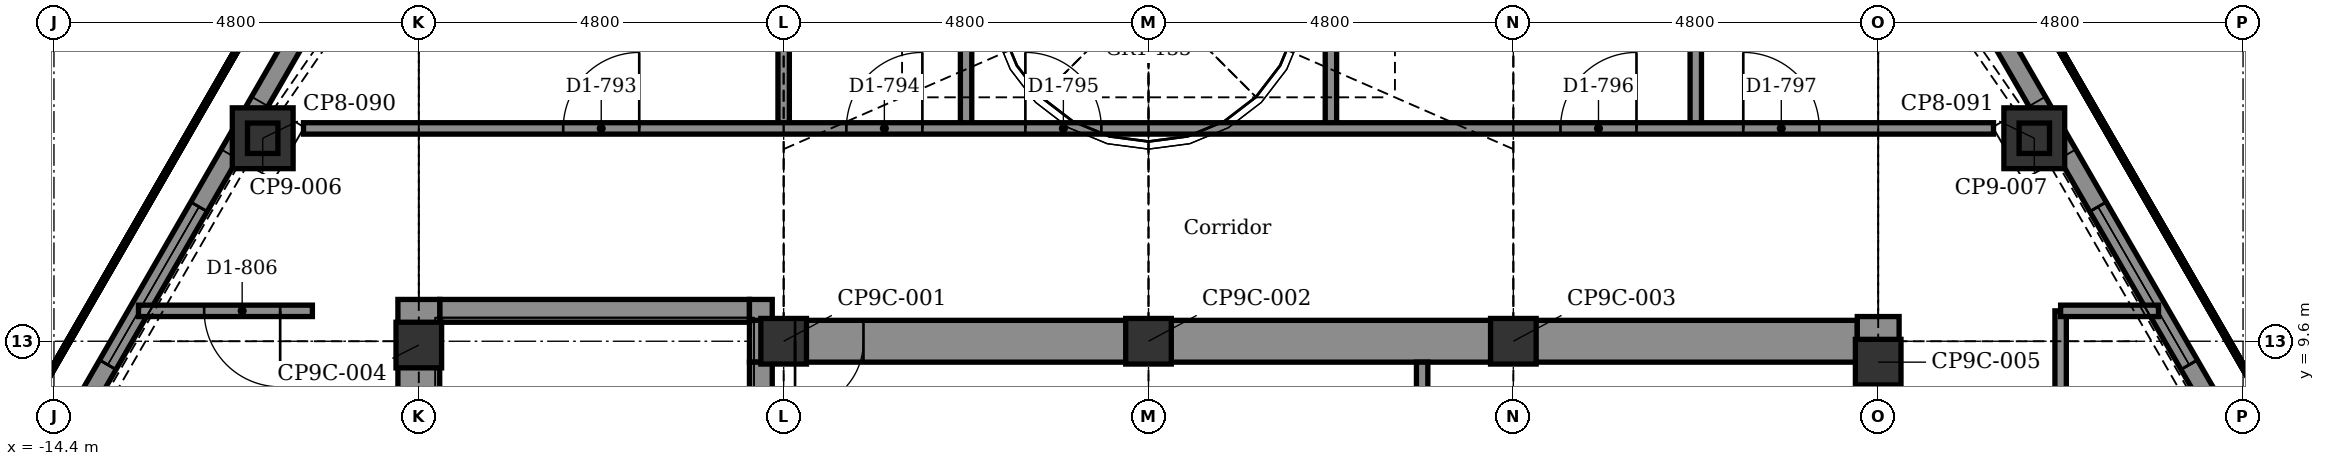
"""IFC4 building model, lengths in metres.
Left out: names, types, materials, properties, quantities, classifications, styles, units other than length and angle.
Written with IfcOpenShell. Run it as: python <this file> out.ifc"""

import sys

from ifc_helpers import new_model, si_unit, direction, frame, frame_2d, origin, origin_2d, place, context, subcontext, project, spatial, polyline, rectangle, hollow_rectangle, outline, extrude, element, fill, save


model = new_model("IFC4")
c1 = context("Model", 3, precision=1e-05, world=origin(), true_north=direction((0.0, 1.0)))
c2 = subcontext(c1, "Body", "Model", "MODEL_VIEW")
j1 = project(units=[si_unit("LENGTHUNIT", "METRE"), si_unit("PLANEANGLEUNIT", "RADIAN")], contexts=[c1])
p1 = place(None, origin())
s1 = spatial("IfcSite", under=j1, at=p1, CompositionType="ELEMENT")
p2 = place(p1, origin())
s2 = spatial("IfcBuilding", under=s1, at=p2, CompositionType="ELEMENT")
p3 = place(p2, frame((0.0, 0.0, 301.9)))
s3 = spatial("IfcBuildingStorey", under=s2, at=p3, CompositionType="ELEMENT", Elevation=301.9)
for number, where, z_axis, x_axis in (
    (1, (11.654, 12.271, -0.3), (0.0, 0.0, 1.0), (0.866, 0.5, 0.0)),
    (2, (-11.654, 12.271, -0.3), (0.0, 0.0, 1.0), (0.5, 0.866, 0.0)),
):
    element("IfcColumn", number, at=place(p3, frame(where, z_axis=z_axis, x_axis=x_axis)), inside=s3, PredefinedType="COLUMN", context=c2, shape_type="SweptSolid", body=[
        extrude(rectangle(XDim=0.8, YDim=0.8, at=origin_2d()), origin(), (0.0, 0.0, 1.0), 5.3),
    ])
p4 = place(p3, frame((-5.25, 9.6, -0.3), z_axis=(0.0, 0.0, 1.0), x_axis=(1.0, 0.0, 0.0)))
e3 = element("IfcWall", 3, at=p4, inside=s3, PredefinedType="SHEAR", context=c2, shape_type="SweptSolid", body=[
    extrude(rectangle(XDim=14.575, YDim=0.55, at=frame_2d((7.288, 0.0))), origin(), (0.0, 0.0, 1.0), 5.3),
])
p5 = place(p4, frame((0.6, 0.0, 0.3)))
e4 = element("IfcOpeningElement", 4, at=p5, cuts=e3, PredefinedType="OPENING", context=c2, shape_type="SweptSolid", body=[
    extrude(rectangle(XDim=0.9, YDim=2.1, at=frame_2d((0.45, 1.05))), frame((0.0, 0.285, 0.0), z_axis=(0.0, -1.0, 0.0), x_axis=(1.0, 0.0, 0.0)), (0.0, 0.0, 1.0), 0.57),
])
p6 = place(p3, frame((-9.325, 10.0, -0.3), z_axis=(0.0, 0.0, 1.0), x_axis=(1.0, 0.0, 0.0)))
e5 = element("IfcWall", 5, at=p6, inside=s3, PredefinedType="STANDARD", context=c2, shape_type="SweptSolid", body=[
    extrude(rectangle(XDim=4.075, YDim=0.3, at=frame_2d((2.038, 0.0))), origin(), (0.0, 0.0, 1.0), 5.3),
])
p7 = place(p3, frame((-9.6, 2.55, -0.3), z_axis=(0.0, 0.0, 1.0), x_axis=(0.0, 1.0, 0.0)))
e6 = element("IfcWall", 6, at=p7, inside=s3, PredefinedType="SHEAR", context=c2, shape_type="SweptSolid", body=[
    extrude(rectangle(XDim=7.6, YDim=0.55, at=frame_2d((3.8, 0.0))), origin(), (0.0, 0.0, 1.0), 5.3),
])
p8 = place(p3, frame((-5.1, 2.25, -0.3), z_axis=(0.0, 0.0, 1.0), x_axis=(0.0, 1.0, 0.0)))
e7 = element("IfcWall", 7, at=p8, inside=s3, PredefinedType="STANDARD", context=c2, shape_type="SweptSolid", body=[
    extrude(rectangle(XDim=7.075, YDim=0.3, at=frame_2d((3.538, 0.0))), origin(), (0.0, 0.0, 1.0), 5.3),
])
p9 = place(p8, frame((2.0, 0.0, 0.3)))
e8 = element("IfcOpeningElement", 8, at=p9, cuts=e7, PredefinedType="OPENING", context=c2, shape_type="SweptSolid", body=[
    extrude(rectangle(XDim=1.2, YDim=2.1, at=frame_2d((0.6, 1.05))), frame((0.0, 0.16, 0.0), z_axis=(0.0, -1.0, 0.0), x_axis=(1.0, 0.0, 0.0)), (0.0, 0.0, 1.0), 0.32),
])
p10 = place(p3, frame((-5.1, 9.875, -0.3), z_axis=(0.0, 0.0, 1.0), x_axis=(0.0, 1.0, 0.0)))
e9 = element("IfcWall", 9, at=p10, inside=s3, PredefinedType="STANDARD", context=c2, shape_type="SweptSolid", body=[
    extrude(rectangle(XDim=0.275, YDim=0.3, at=frame_2d((0.137, 0.0))), origin(), (0.0, 0.0, 1.0), 5.3),
])
p11 = place(p3, frame((9.6, -10.15, -0.3), z_axis=(0.0, 0.0, 1.0), x_axis=(0.0, 1.0, 0.0)))
e10 = element("IfcWall", 10, at=p11, inside=s3, PredefinedType="SHEAR", context=c2, shape_type="SweptSolid", body=[
    extrude(rectangle(XDim=20.075, YDim=0.55, at=frame_2d((10.038, 0.0))), origin(), (0.0, 0.0, 1.0), 5.3),
])
for number, where, z_axis, x_axis in (
    (11, (11.654, 12.271, 5.0), (0.0, 0.0, 1.0), (1.0, 0.0, 0.0)),
    (12, (-11.654, 12.271, 5.0), (0.0, 0.0, 1.0), (1.0, 0.0, 0.0)),
):
    element("IfcColumn", number, at=place(p3, frame(where, z_axis=z_axis, x_axis=x_axis)), inside=s3, PredefinedType="COLUMN", context=c2, shape_type="SweptSolid", body=[
        extrude(hollow_rectangle(XDim=0.4, YDim=0.4, WallThickness=0.02, at=origin_2d()), origin(), (0.0, 0.0, 1.0), 17.513),
    ])
p12 = place(p3, frame((-9.6, 9.55, 5.0), z_axis=(0.0, 0.0, 1.0), x_axis=(1.0, 0.0, 0.0)))
e13 = element("IfcColumn", 13, at=p12, inside=s3, PredefinedType="COLUMN", context=c2, shape_type="SweptSolid", body=[
    extrude(hollow_rectangle(XDim=0.6, YDim=0.6, WallThickness=0.032, at=origin_2d()), origin(), (0.0, 0.0, 1.0), 15.709),
])
for number, where, z_axis, x_axis in (
    (14, (-4.8, 9.6, 5.0), (0.0, 0.0, 1.0), (1.0, 0.0, 0.0)),
    (15, (0.0, 9.6, 5.0), (0.0, 0.0, 1.0), (1.0, 0.0, 0.0)),
    (16, (4.8, 9.6, 5.0), (0.0, 0.0, 1.0), (1.0, 0.0, 0.0)),
):
    element("IfcColumn", number, at=place(p3, frame(where, z_axis=z_axis, x_axis=x_axis)), inside=s3, PredefinedType="COLUMN", context=c2, shape_type="SweptSolid", body=[
        extrude(hollow_rectangle(XDim=0.6, YDim=0.6, WallThickness=0.032, at=origin_2d()), origin(), (0.0, 0.0, 1.0), 14.915),
    ])
p13 = place(p3, frame((9.6, 9.325, 5.0), z_axis=(0.0, 0.0, 1.0), x_axis=(1.0, 0.0, 0.0)))
e17 = element("IfcColumn", 17, at=p13, inside=s3, PredefinedType="COLUMN", context=c2, shape_type="SweptSolid", body=[
    extrude(hollow_rectangle(XDim=0.6, YDim=0.6, WallThickness=0.032, at=origin_2d()), origin(), (0.0, 0.0, 1.0), 15.569),
])
p14 = place(p3, frame((10.358, 15.065, 0.0), z_axis=(0.0, 0.0, 1.0), x_axis=(0.500010301671, -0.86601945603, 0.0)))
e18 = element("IfcWall", 18, at=p14, inside=s3, PredefinedType="SOLIDWALL", context=c2, shape_type="SweptSolid", body=[
    extrude(outline(polyline([(0.0, 0.0), (15.736, 0.0), (15.736, 15.994), (0.0, 24.509), (0.0, 0.0)])), frame((0.0, 0.125, 0.0), z_axis=(0.0, -1.0, 0.0), x_axis=(1.0, 0.0, 0.0)), (0.0, 0.0, 1.0), 0.25),
])
p15 = place(p14, frame((4.268, 0.0, 5.8)))
e19 = element("IfcOpeningElement", 19, at=p15, cuts=e18, PredefinedType="OPENING", context=c2, shape_type="SweptSolid", body=[
    extrude(rectangle(XDim=2.4, YDim=3.6, at=frame_2d((1.2, 1.8))), frame((0.0, 0.135, 0.0), z_axis=(0.0, -1.0, 0.0), x_axis=(1.0, 0.0, 0.0)), (0.0, 0.0, 1.0), 0.27),
])
p16 = place(p14, frame((4.268, 0.0, 10.0)))
e20 = element("IfcOpeningElement", 20, at=p16, cuts=e18, PredefinedType="OPENING", context=c2, shape_type="SweptSolid", body=[
    extrude(rectangle(XDim=2.4, YDim=3.6, at=frame_2d((1.2, 1.8))), frame((0.0, 0.135, 0.0), z_axis=(0.0, -1.0, 0.0), x_axis=(1.0, 0.0, 0.0)), (0.0, 0.0, 1.0), 0.27),
])
p17 = place(p14, frame((4.268, 0.0, 14.2)))
e21 = element("IfcOpeningElement", 21, at=p17, cuts=e18, PredefinedType="OPENING", context=c2, shape_type="SweptSolid", body=[
    extrude(rectangle(XDim=2.4, YDim=3.6, at=frame_2d((1.2, 1.8))), frame((0.0, 0.135, 0.0), z_axis=(0.0, -1.0, 0.0), x_axis=(1.0, 0.0, 0.0)), (0.0, 0.0, 1.0), 0.27),
])
p18 = place(p14, frame((9.068, 0.0, 5.8)))
e22 = element("IfcOpeningElement", 22, at=p18, cuts=e18, PredefinedType="OPENING", context=c2, shape_type="SweptSolid", body=[
    extrude(rectangle(XDim=2.4, YDim=3.6, at=frame_2d((1.2, 1.8))), frame((0.0, 0.135, 0.0), z_axis=(0.0, -1.0, 0.0), x_axis=(1.0, 0.0, 0.0)), (0.0, 0.0, 1.0), 0.27),
])
p19 = place(p14, frame((9.068, 0.0, 10.0)))
e23 = element("IfcOpeningElement", 23, at=p19, cuts=e18, PredefinedType="OPENING", context=c2, shape_type="SweptSolid", body=[
    extrude(rectangle(XDim=2.4, YDim=3.6, at=frame_2d((1.2, 1.8))), frame((0.0, 0.135, 0.0), z_axis=(0.0, -1.0, 0.0), x_axis=(1.0, 0.0, 0.0)), (0.0, 0.0, 1.0), 0.27),
])
p20 = place(p14, frame((9.068, 0.0, 1.0)))
e24 = element("IfcOpeningElement", 24, at=p20, cuts=e18, PredefinedType="OPENING", context=c2, shape_type="SweptSolid", body=[
    extrude(rectangle(XDim=2.4, YDim=3.0, at=frame_2d((1.2, 1.5))), frame((0.0, 0.135, 0.0), z_axis=(0.0, -1.0, 0.0), x_axis=(1.0, 0.0, 0.0)), (0.0, 0.0, 1.0), 0.27),
])
p21 = place(p3, frame((-18.226, 1.438, 0.0), z_axis=(0.0, 0.0, 1.0), x_axis=(0.500010301671, 0.86601945603, 0.0)))
e25 = element("IfcWall", 25, at=p21, inside=s3, PredefinedType="SOLIDWALL", context=c2, shape_type="SweptSolid", body=[
    extrude(outline(polyline([(0.0, 0.0), (15.736, 0.0), (15.736, 24.509), (0.0, 15.994), (0.0, 0.0)])), frame((0.0, 0.125, 0.0), z_axis=(0.0, -1.0, 0.0), x_axis=(1.0, 0.0, 0.0)), (0.0, 0.0, 1.0), 0.25),
])
p22 = place(p21, frame((4.268, 0.0, 5.8)))
e26 = element("IfcOpeningElement", 26, at=p22, cuts=e25, PredefinedType="OPENING", context=c2, shape_type="SweptSolid", body=[
    extrude(rectangle(XDim=2.4, YDim=3.6, at=frame_2d((1.2, 1.8))), frame((0.0, 0.135, 0.0), z_axis=(0.0, -1.0, 0.0), x_axis=(1.0, 0.0, 0.0)), (0.0, 0.0, 1.0), 0.27),
])
p23 = place(p21, frame((4.268, 0.0, 10.0)))
e27 = element("IfcOpeningElement", 27, at=p23, cuts=e25, PredefinedType="OPENING", context=c2, shape_type="SweptSolid", body=[
    extrude(rectangle(XDim=2.4, YDim=3.6, at=frame_2d((1.2, 1.8))), frame((0.0, 0.135, 0.0), z_axis=(0.0, -1.0, 0.0), x_axis=(1.0, 0.0, 0.0)), (0.0, 0.0, 1.0), 0.27),
])
p24 = place(p21, frame((9.068, 0.0, 5.8)))
e28 = element("IfcOpeningElement", 28, at=p24, cuts=e25, PredefinedType="OPENING", context=c2, shape_type="SweptSolid", body=[
    extrude(rectangle(XDim=2.4, YDim=3.6, at=frame_2d((1.2, 1.8))), frame((0.0, 0.135, 0.0), z_axis=(0.0, -1.0, 0.0), x_axis=(1.0, 0.0, 0.0)), (0.0, 0.0, 1.0), 0.27),
])
p25 = place(p21, frame((9.068, 0.0, 10.0)))
e29 = element("IfcOpeningElement", 29, at=p25, cuts=e25, PredefinedType="OPENING", context=c2, shape_type="SweptSolid", body=[
    extrude(rectangle(XDim=2.4, YDim=3.6, at=frame_2d((1.2, 1.8))), frame((0.0, 0.135, 0.0), z_axis=(0.0, -1.0, 0.0), x_axis=(1.0, 0.0, 0.0)), (0.0, 0.0, 1.0), 0.27),
])
p26 = place(p21, frame((9.068, 0.0, 14.2)))
e30 = element("IfcOpeningElement", 30, at=p26, cuts=e25, PredefinedType="OPENING", context=c2, shape_type="SweptSolid", body=[
    extrude(rectangle(XDim=2.4, YDim=3.6, at=frame_2d((1.2, 1.8))), frame((0.0, 0.135, 0.0), z_axis=(0.0, -1.0, 0.0), x_axis=(1.0, 0.0, 0.0)), (0.0, 0.0, 1.0), 0.27),
])
p27 = place(p21, frame((4.268, 0.0, 1.0)))
e31 = element("IfcOpeningElement", 31, at=p27, cuts=e25, PredefinedType="OPENING", context=c2, shape_type="SweptSolid", body=[
    extrude(rectangle(XDim=2.4, YDim=3.0, at=frame_2d((1.2, 1.5))), frame((0.0, 0.135, 0.0), z_axis=(0.0, -1.0, 0.0), x_axis=(1.0, 0.0, 0.0)), (0.0, 0.0, 1.0), 0.27),
])
p28 = place(p3, frame((12.0, -10.0, 0.0), z_axis=(0.0, 0.0, 1.0), x_axis=(0.0, 1.0, 0.0)))
e32 = element("IfcWall", 32, at=p28, inside=s3, PredefinedType="PARTITIONING", context=c2, shape_type="SweptSolid", body=[
    extrude(rectangle(XDim=20.0, YDim=0.15, at=frame_2d((10.0, 0.0))), origin(), (0.0, 0.0, 1.0), 5.0),
])
p29 = place(p28, frame((9.5, 0.0, 0.0)))
e33 = element("IfcOpeningElement", 33, at=p29, cuts=e32, PredefinedType="OPENING", context=c2, shape_type="SweptSolid", body=[
    extrude(rectangle(XDim=1.0, YDim=2.1, at=frame_2d((0.5, 1.05))), frame((0.0, 0.085, 0.0), z_axis=(0.0, -1.0, 0.0), x_axis=(1.0, 0.0, 0.0)), (0.0, 0.0, 1.0), 0.17),
])
p30 = place(p3, frame((7.2, 12.4, 0.0), z_axis=(0.0, 0.0, 1.0), x_axis=(0.0, 1.0, 0.0)))
e34 = element("IfcWall", 34, at=p30, inside=s3, PredefinedType="PARTITIONING", context=c2, shape_type="SweptSolid", body=[
    extrude(rectangle(XDim=4.058, YDim=0.15, at=frame_2d((2.029, 0.0))), origin(), (0.0, 0.0, 1.0), 5.0),
])
p31 = place(p3, frame((3.6, 6.0, 0.0), z_axis=(0.0, 0.0, 1.0), x_axis=(0.0, 1.0, 0.0)))
e35 = element("IfcWall", 35, at=p31, inside=s3, PredefinedType="PARTITIONING", context=c2, shape_type="SweptSolid", body=[
    extrude(rectangle(XDim=3.325, YDim=0.15, at=frame_2d((1.663, 0.0))), origin(), (0.0, 0.0, 1.0), 5.0),
])
p32 = place(p31, frame((1.4, 0.0, 0.0)))
e36 = element("IfcOpeningElement", 36, at=p32, cuts=e35, PredefinedType="OPENING", context=c2, shape_type="SweptSolid", body=[
    extrude(rectangle(XDim=0.8, YDim=2.1, at=frame_2d((0.4, 1.05))), frame((0.0, 0.085, 0.0), z_axis=(0.0, -1.0, 0.0), x_axis=(1.0, 0.0, 0.0)), (0.0, 0.0, 1.0), 0.17),
])
for number, where, z_axis, x_axis in (
    (37, (2.4, 12.4, 0.0), (0.0, 0.0, 1.0), (0.0, 1.0, 0.0)),
    (38, (-2.4, 12.4, 0.0), (0.0, 0.0, 1.0), (0.0, 1.0, 0.0)),
):
    element("IfcWall", number, at=place(p3, frame(where, z_axis=z_axis, x_axis=x_axis)), inside=s3, PredefinedType="PARTITIONING", context=c2, shape_type="SweptSolid", body=[
        extrude(rectangle(XDim=4.058, YDim=0.15, at=frame_2d((2.029, 0.0))), origin(), (0.0, 0.0, 1.0), 5.0),
    ])
p33 = place(p3, frame((-4.8, 12.4, 0.0), z_axis=(0.0, 0.0, 1.0), x_axis=(0.0, 1.0, 0.0)))
e39 = element("IfcWall", 39, at=p33, inside=s3, PredefinedType="PARTITIONING", context=c2, shape_type="SweptSolid", body=[
    extrude(rectangle(XDim=3.428, YDim=0.15, at=frame_2d((1.714, 0.0))), origin(), (0.0, 0.0, 1.0), 5.0),
])
p34 = place(p3, frame((-13.288, 10.0, 0.0), z_axis=(0.0, 0.0, 1.0), x_axis=(1.0, 0.0, 0.0)))
e40 = element("IfcWall", 40, at=p34, inside=s3, PredefinedType="PARTITIONING", context=c2, shape_type="SweptSolid", body=[
    extrude(rectangle(XDim=2.288, YDim=0.15, at=frame_2d((1.144, 0.0))), origin(), (0.0, 0.0, 1.0), 5.0),
])
p35 = place(p34, frame((0.864, 0.0, 0.0)))
e41 = element("IfcOpeningElement", 41, at=p35, cuts=e40, PredefinedType="OPENING", context=c2, shape_type="SweptSolid", body=[
    extrude(rectangle(XDim=1.0, YDim=2.1, at=frame_2d((0.5, 1.05))), frame((0.0, 0.085, 0.0), z_axis=(0.0, -1.0, 0.0), x_axis=(1.0, 0.0, 0.0)), (0.0, 0.0, 1.0), 0.17),
])
p36 = place(p3, frame((12.0, 10.0, 0.0), z_axis=(0.0, 0.0, 1.0), x_axis=(1.0, 0.0, 0.0)))
e42 = element("IfcWall", 42, at=p36, inside=s3, PredefinedType="PARTITIONING", context=c2, shape_type="SweptSolid", body=[
    extrude(rectangle(XDim=1.288, YDim=0.15, at=frame_2d((0.644, 0.0))), origin(), (0.0, 0.0, 1.0), 5.0),
])
p37 = place(p3, frame((-11.117, 12.4, 0.0), z_axis=(0.0, 0.0, 1.0), x_axis=(1.0, 0.0, 0.0)))
e43 = element("IfcWall", 43, at=p37, inside=s3, PredefinedType="PARTITIONING", context=c2, shape_type="SweptSolid", body=[
    extrude(rectangle(XDim=22.234, YDim=0.15, at=frame_2d((11.117, 0.0))), origin(), (0.0, 0.0, 1.0), 5.0),
])
p38 = place(p37, frame((3.417, 0.0, 0.0)))
e44 = element("IfcOpeningElement", 44, at=p38, cuts=e43, PredefinedType="OPENING", context=c2, shape_type="SweptSolid", body=[
    extrude(rectangle(XDim=1.0, YDim=2.1, at=frame_2d((0.5, 1.05))), frame((0.0, 0.085, 0.0), z_axis=(0.0, -1.0, 0.0), x_axis=(1.0, 0.0, 0.0)), (0.0, 0.0, 1.0), 0.17),
])
p39 = place(p37, frame((7.142, 0.0, 0.0)))
e45 = element("IfcOpeningElement", 45, at=p39, cuts=e43, PredefinedType="OPENING", context=c2, shape_type="SweptSolid", body=[
    extrude(rectangle(XDim=1.0, YDim=2.1, at=frame_2d((0.5, 1.05))), frame((0.0, 0.085, 0.0), z_axis=(0.0, -1.0, 0.0), x_axis=(1.0, 0.0, 0.0)), (0.0, 0.0, 1.0), 0.17),
])
p40 = place(p37, frame((9.497, 0.0, 0.0)))
e46 = element("IfcOpeningElement", 46, at=p40, cuts=e43, PredefinedType="OPENING", context=c2, shape_type="SweptSolid", body=[
    extrude(rectangle(XDim=1.0, YDim=2.1, at=frame_2d((0.5, 1.05))), frame((0.0, 0.085, 0.0), z_axis=(0.0, -1.0, 0.0), x_axis=(1.0, 0.0, 0.0)), (0.0, 0.0, 1.0), 0.17),
])
p41 = place(p37, frame((16.537, 0.0, 0.0)))
e47 = element("IfcOpeningElement", 47, at=p41, cuts=e43, PredefinedType="OPENING", context=c2, shape_type="SweptSolid", body=[
    extrude(rectangle(XDim=1.0, YDim=2.1, at=frame_2d((0.5, 1.05))), frame((0.0, 0.085, 0.0), z_axis=(0.0, -1.0, 0.0), x_axis=(1.0, 0.0, 0.0)), (0.0, 0.0, 1.0), 0.17),
])
p42 = place(p37, frame((18.942, 0.0, 0.0)))
e48 = element("IfcOpeningElement", 48, at=p42, cuts=e43, PredefinedType="OPENING", context=c2, shape_type="SweptSolid", body=[
    extrude(rectangle(XDim=1.0, YDim=2.1, at=frame_2d((0.5, 1.05))), frame((0.0, 0.085, 0.0), z_axis=(0.0, -1.0, 0.0), x_axis=(1.0, 0.0, 0.0)), (0.0, 0.0, 1.0), 0.17),
])
p43 = place(p38, origin())
e49 = element("IfcDoor", 49, at=p43, inside=s3, OperationType="SINGLE_SWING_RIGHT", PredefinedType="DOOR", context=c2, shape_type="SweptSolid", body=[
    extrude(rectangle(XDim=1.0, YDim=2.1, at=frame_2d((0.5, 1.05))), frame((0.0, 0.025, 0.0), z_axis=(0.0, -1.0, 0.0), x_axis=(1.0, 0.0, 0.0)), (0.0, 0.0, 1.0), 0.05),
])
fill(e44, e49)
p44 = place(p39, origin())
e50 = element("IfcDoor", 50, at=p44, inside=s3, OperationType="SINGLE_SWING_RIGHT", PredefinedType="DOOR", context=c2, shape_type="SweptSolid", body=[
    extrude(rectangle(XDim=1.0, YDim=2.1, at=frame_2d((0.5, 1.05))), frame((0.0, 0.025, 0.0), z_axis=(0.0, -1.0, 0.0), x_axis=(1.0, 0.0, 0.0)), (0.0, 0.0, 1.0), 0.05),
])
fill(e45, e50)
p45 = place(p40, origin())
e51 = element("IfcDoor", 51, at=p45, inside=s3, OperationType="SINGLE_SWING_LEFT", PredefinedType="DOOR", context=c2, shape_type="SweptSolid", body=[
    extrude(rectangle(XDim=1.0, YDim=2.1, at=frame_2d((0.5, 1.05))), frame((0.0, 0.025, 0.0), z_axis=(0.0, -1.0, 0.0), x_axis=(1.0, 0.0, 0.0)), (0.0, 0.0, 1.0), 0.05),
])
fill(e46, e51)
p46 = place(p41, origin())
e52 = element("IfcDoor", 52, at=p46, inside=s3, OperationType="SINGLE_SWING_RIGHT", PredefinedType="DOOR", context=c2, shape_type="SweptSolid", body=[
    extrude(rectangle(XDim=1.0, YDim=2.1, at=frame_2d((0.5, 1.05))), frame((0.0, 0.025, 0.0), z_axis=(0.0, -1.0, 0.0), x_axis=(1.0, 0.0, 0.0)), (0.0, 0.0, 1.0), 0.05),
])
fill(e47, e52)
p47 = place(p42, origin())
e53 = element("IfcDoor", 53, at=p47, inside=s3, OperationType="SINGLE_SWING_LEFT", PredefinedType="DOOR", context=c2, shape_type="SweptSolid", body=[
    extrude(rectangle(XDim=1.0, YDim=2.1, at=frame_2d((0.5, 1.05))), frame((0.0, 0.025, 0.0), z_axis=(0.0, -1.0, 0.0), x_axis=(1.0, 0.0, 0.0)), (0.0, 0.0, 1.0), 0.05),
])
fill(e48, e53)
p48 = place(p35, frame((1.0, 0.0, 0.0), z_axis=(0.0, 0.0, 1.0), x_axis=(-1.0, 0.0, 0.0)))
e54 = element("IfcDoor", 54, at=p48, inside=s3, OperationType="SINGLE_SWING_RIGHT", PredefinedType="DOOR", context=c2, shape_type="SweptSolid", body=[
    extrude(rectangle(XDim=1.0, YDim=2.1, at=frame_2d((0.5, 1.05))), frame((0.0, 0.025, 0.0), z_axis=(0.0, -1.0, 0.0), x_axis=(1.0, 0.0, 0.0)), (0.0, 0.0, 1.0), 0.05),
])
fill(e41, e54)
p49 = place(p5, frame((0.9, 0.0, 0.0), z_axis=(0.0, 0.0, 1.0), x_axis=(-1.0, 0.0, 0.0)))
e55 = element("IfcDoor", 55, at=p49, inside=s3, OperationType="SINGLE_SWING_LEFT", PredefinedType="DOOR", context=c2, shape_type="SweptSolid", body=[
    extrude(rectangle(XDim=0.9, YDim=2.1, at=frame_2d((0.45, 1.05))), frame((0.0, 0.025, 0.0), z_axis=(0.0, -1.0, 0.0), x_axis=(1.0, 0.0, 0.0)), (0.0, 0.0, 1.0), 0.05),
])
fill(e4, e55)
p50 = place(p15, origin())
e56 = element("IfcWindow", 56, at=p50, inside=s3, PartitioningType="SINGLE_PANEL", PredefinedType="WINDOW", context=c2, shape_type="SweptSolid", body=[
    extrude(rectangle(XDim=2.4, YDim=3.6, at=frame_2d((1.2, 1.8))), frame((0.0, 0.03, 0.0), z_axis=(0.0, -1.0, 0.0), x_axis=(1.0, 0.0, 0.0)), (0.0, 0.0, 1.0), 0.06),
])
fill(e19, e56)
p51 = place(p16, origin())
e57 = element("IfcWindow", 57, at=p51, inside=s3, PartitioningType="SINGLE_PANEL", PredefinedType="WINDOW", context=c2, shape_type="SweptSolid", body=[
    extrude(rectangle(XDim=2.4, YDim=3.6, at=frame_2d((1.2, 1.8))), frame((0.0, 0.03, 0.0), z_axis=(0.0, -1.0, 0.0), x_axis=(1.0, 0.0, 0.0)), (0.0, 0.0, 1.0), 0.06),
])
fill(e20, e57)
p52 = place(p17, origin())
e58 = element("IfcWindow", 58, at=p52, inside=s3, PartitioningType="SINGLE_PANEL", PredefinedType="WINDOW", context=c2, shape_type="SweptSolid", body=[
    extrude(rectangle(XDim=2.4, YDim=3.6, at=frame_2d((1.2, 1.8))), frame((0.0, 0.03, 0.0), z_axis=(0.0, -1.0, 0.0), x_axis=(1.0, 0.0, 0.0)), (0.0, 0.0, 1.0), 0.06),
])
fill(e21, e58)
p53 = place(p24, origin())
e59 = element("IfcWindow", 59, at=p53, inside=s3, PartitioningType="SINGLE_PANEL", PredefinedType="WINDOW", context=c2, shape_type="SweptSolid", body=[
    extrude(rectangle(XDim=2.4, YDim=3.6, at=frame_2d((1.2, 1.8))), frame((0.0, 0.03, 0.0), z_axis=(0.0, -1.0, 0.0), x_axis=(1.0, 0.0, 0.0)), (0.0, 0.0, 1.0), 0.06),
])
fill(e28, e59)
p54 = place(p25, origin())
e60 = element("IfcWindow", 60, at=p54, inside=s3, PartitioningType="SINGLE_PANEL", PredefinedType="WINDOW", context=c2, shape_type="SweptSolid", body=[
    extrude(rectangle(XDim=2.4, YDim=3.6, at=frame_2d((1.2, 1.8))), frame((0.0, 0.03, 0.0), z_axis=(0.0, -1.0, 0.0), x_axis=(1.0, 0.0, 0.0)), (0.0, 0.0, 1.0), 0.06),
])
fill(e29, e60)
p55 = place(p26, origin())
e61 = element("IfcWindow", 61, at=p55, inside=s3, PartitioningType="SINGLE_PANEL", PredefinedType="WINDOW", context=c2, shape_type="SweptSolid", body=[
    extrude(rectangle(XDim=2.4, YDim=3.6, at=frame_2d((1.2, 1.8))), frame((0.0, 0.03, 0.0), z_axis=(0.0, -1.0, 0.0), x_axis=(1.0, 0.0, 0.0)), (0.0, 0.0, 1.0), 0.06),
])
fill(e30, e61)
save(model, sys.argv[1])
